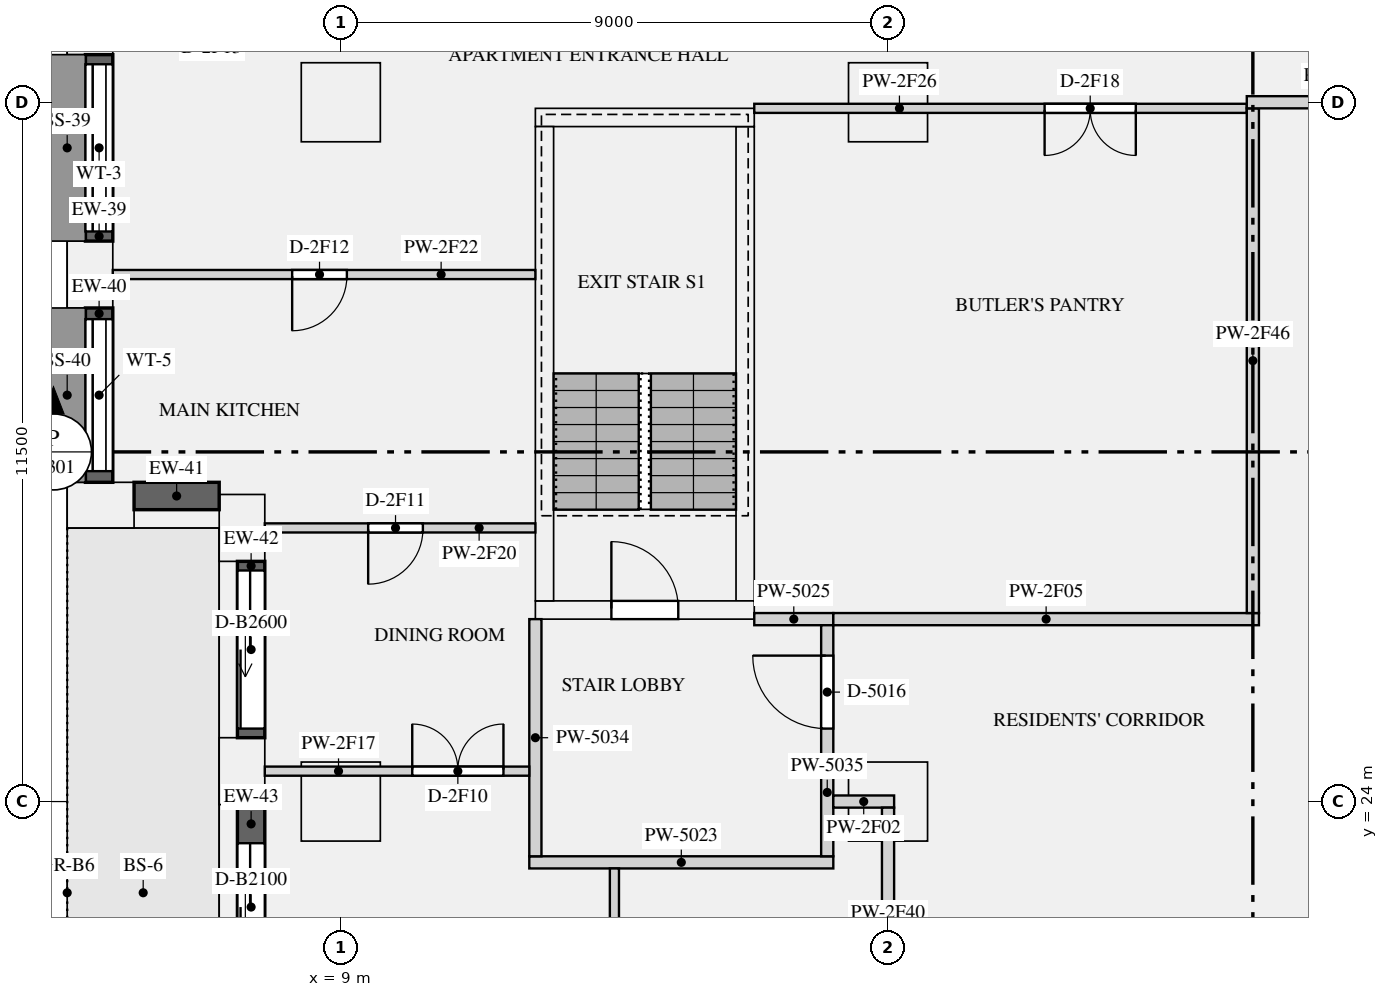
"""IFC4 building model, lengths in metres.
Left out: names, types, materials, properties, quantities, classifications, styles, units other than length and angle.
Written with IfcOpenShell. Run it as: python <this file> out.ifc"""

import sys

from ifc_helpers import new_model, si_unit, direction, frame, frame_2d, origin, origin_2d, place, context, subcontext, project, spatial, rectangle, extrude, element, fill, save


model = new_model("IFC4")
c1 = context("Model", 3, precision=1e-05, world=origin(), true_north=direction((0.0, 1.0)))
c2 = subcontext(c1, "Body", "Model", "MODEL_VIEW")
j1 = project(units=[si_unit("LENGTHUNIT", "METRE"), si_unit("PLANEANGLEUNIT", "RADIAN")], contexts=[c1])
p1 = place(None, origin())
s1 = spatial("IfcSite", under=j1, at=p1, CompositionType="ELEMENT")
p2 = place(p1, origin())
s2 = spatial("IfcBuilding", under=s1, at=p2, CompositionType="ELEMENT")
p3 = place(p2, frame((0.0, 0.0, 124.5)))
s3 = spatial("IfcBuildingStorey", under=s2, at=p3, CompositionType="ELEMENT", Elevation=124.5)
for number, where, z_axis, x_axis in (
    (1, (4.875, 36.833, 0.0), (0.0, 0.0, 1.0), (0.0, -1.0, 0.0)),
    (2, (4.875, 32.667, 0.0), (0.0, 0.0, 1.0), (0.0, -1.0, 0.0)),
    (3, (5.05, 28.875, 0.0), (0.0, 0.0, 1.0), (1.0, 0.0, 0.0)),
    (4, (7.375, 28.5, 0.0), (0.0, 0.0, 1.0), (0.0, -1.0, 0.0)),
    (5, (7.375, 24.5, 0.0), (0.0, 0.0, 1.0), (0.0, -1.0, 0.0)),
):
    element("IfcColumn", number, at=place(p3, frame(where, z_axis=z_axis, x_axis=x_axis)), inside=s3, PredefinedType="USERDEFINED", context=c2, shape_type="SweptSolid", body=[
        extrude(rectangle(XDim=1.1, YDim=0.75, at=origin_2d()), origin(), (0.0, 0.0, 1.0), 3.15),
    ])
for number, where, z_axis, x_axis in (
    (6, (9.0, 24.0, 0.0), (0.0, 0.0, 1.0), (1.0, 0.0, 0.0)),
    (7, (18.0, 24.0, 0.0), (0.0, 0.0, 1.0), (1.0, 0.0, 0.0)),
    (8, (9.0, 35.5, 0.0), (0.0, 0.0, 1.0), (1.0, 0.0, 0.0)),
    (9, (18.0, 35.5, 0.0), (0.0, 0.0, 1.0), (1.0, 0.0, 0.0)),
):
    element("IfcColumn", number, at=place(p3, frame(where, z_axis=z_axis, x_axis=x_axis)), inside=s3, PredefinedType="COLUMN", context=c2, shape_type="SweptSolid", body=[
        extrude(rectangle(XDim=1.3, YDim=1.3, at=origin_2d()), origin(), (0.0, 0.0, 1.0), 3.15),
    ])
p4 = place(p3, frame((12.2, 27.15, 0.0), z_axis=(0.0, 0.0, 1.0), x_axis=(1.0, 0.0, 0.0)))
e10 = element("IfcWall", 10, at=p4, inside=s3, PredefinedType="SHEAR", context=c2, shape_type="SweptSolid", body=[
    extrude(rectangle(XDim=3.6, YDim=0.3, at=frame_2d((1.8, 0.0))), origin(), (0.0, 0.0, 1.0), 3.15),
])
p5 = place(p4, frame((1.25, 0.0, 0.0)))
e11 = element("IfcOpeningElement", 11, at=p5, cuts=e10, PredefinedType="OPENING", context=c2, shape_type="SweptSolid", body=[
    extrude(rectangle(XDim=1.1, YDim=2.1, at=frame_2d((0.55, 1.05))), frame((0.0, 0.16, 0.0), z_axis=(0.0, -1.0, 0.0), x_axis=(1.0, 0.0, 0.0)), (0.0, 0.0, 1.0), 0.32),
])
p6 = place(p3, frame((12.2, 35.25, 0.0), z_axis=(0.0, 0.0, 1.0), x_axis=(1.0, 0.0, 0.0)))
e12 = element("IfcWall", 12, at=p6, inside=s3, PredefinedType="SHEAR", context=c2, shape_type="SweptSolid", body=[
    extrude(rectangle(XDim=3.6, YDim=0.3, at=frame_2d((1.8, 0.0))), origin(), (0.0, 0.0, 1.0), 3.15),
])
for number, where, z_axis, x_axis in (
    (13, (12.35, 27.3, 0.0), (0.0, 0.0, 1.0), (0.0, 1.0, 0.0)),
    (14, (15.65, 27.3, 0.0), (0.0, 0.0, 1.0), (0.0, 1.0, 0.0)),
):
    element("IfcWall", number, at=place(p3, frame(where, z_axis=z_axis, x_axis=x_axis)), inside=s3, PredefinedType="SHEAR", context=c2, shape_type="SweptSolid", body=[
        extrude(rectangle(XDim=7.8, YDim=0.3, at=frame_2d((3.9, 0.0))), origin(), (0.0, 0.0, 1.0), 3.15),
    ])
p7 = place(p3, frame((5.025, 36.283, 0.9), z_axis=(0.0, 0.0, 1.0), x_axis=(0.0, -1.0, 0.0)))
e15 = element("IfcWall", 15, at=p7, inside=s3, PredefinedType="SOLIDWALL", context=c2, shape_type="SweptSolid", body=[
    extrude(rectangle(XDim=3.066, YDim=0.45, at=frame_2d((1.533, 0.0))), origin(), (0.0, 0.0, 1.0), 1.93),
])
p8 = place(p7, frame((0.158, 0.0, 0.15)))
e16 = element("IfcOpeningElement", 16, at=p8, cuts=e15, PredefinedType="OPENING", context=c2, shape_type="SweptSolid", body=[
    extrude(rectangle(XDim=2.75, YDim=1.5, at=frame_2d((1.375, 0.75))), frame((0.0, 0.235, 0.0), z_axis=(0.0, -1.0, 0.0), x_axis=(1.0, 0.0, 0.0)), (0.0, 0.0, 1.0), 0.47),
])
p9 = place(p3, frame((5.025, 32.117, 0.9), z_axis=(0.0, 0.0, 1.0), x_axis=(0.0, -1.0, 0.0)))
e17 = element("IfcWall", 17, at=p9, inside=s3, PredefinedType="SOLIDWALL", context=c2, shape_type="SweptSolid", body=[
    extrude(rectangle(XDim=2.867, YDim=0.45, at=frame_2d((1.434, 0.0))), origin(), (0.0, 0.0, 1.0), 1.93),
])
p10 = place(p9, frame((0.184, 0.0, 0.15)))
e18 = element("IfcOpeningElement", 18, at=p10, cuts=e17, PredefinedType="OPENING", context=c2, shape_type="SweptSolid", body=[
    extrude(rectangle(XDim=2.5, YDim=1.5, at=frame_2d((1.25, 0.75))), frame((0.0, 0.235, 0.0), z_axis=(0.0, -1.0, 0.0), x_axis=(1.0, 0.0, 0.0)), (0.0, 0.0, 1.0), 0.47),
])
p11 = place(p3, frame((5.6, 29.025, 0.9), z_axis=(0.0, 0.0, 1.0), x_axis=(1.0, 0.0, 0.0)))
e19 = element("IfcWall", 19, at=p11, inside=s3, PredefinedType="SOLIDWALL", context=c2, shape_type="SweptSolid", body=[
    extrude(rectangle(XDim=1.4, YDim=0.45, at=frame_2d((0.7, 0.0))), origin(), (0.0, 0.0, 1.0), 1.93),
])
p12 = place(p3, frame((7.525, 27.95, 0.0), z_axis=(0.0, 0.0, 1.0), x_axis=(0.0, -1.0, 0.0)))
e20 = element("IfcWall", 20, at=p12, inside=s3, PredefinedType="SOLIDWALL", context=c2, shape_type="SweptSolid", body=[
    extrude(rectangle(XDim=2.9, YDim=0.45, at=frame_2d((1.45, 0.0))), origin(), (0.0, 0.0, 1.0), 2.83),
])
p13 = place(p12, frame((0.15, 0.0, 0.0)))
e21 = element("IfcOpeningElement", 21, at=p13, cuts=e20, PredefinedType="OPENING", context=c2, shape_type="SweptSolid", body=[
    extrude(rectangle(XDim=2.6, YDim=2.3, at=frame_2d((1.3, 1.15))), frame((0.0, 0.235, 0.0), z_axis=(0.0, -1.0, 0.0), x_axis=(1.0, 0.0, 0.0)), (0.0, 0.0, 1.0), 0.47),
])
p14 = place(p3, frame((7.525, 23.95, 0.0), z_axis=(0.0, 0.0, 1.0), x_axis=(0.0, -1.0, 0.0)))
e22 = element("IfcWall", 22, at=p14, inside=s3, PredefinedType="SOLIDWALL", context=c2, shape_type="SweptSolid", body=[
    extrude(rectangle(XDim=2.9, YDim=0.45, at=frame_2d((1.45, 0.0))), origin(), (0.0, 0.0, 1.0), 2.83),
])
p15 = place(p14, frame((0.635, 0.0, 0.0)))
e23 = element("IfcOpeningElement", 23, at=p15, cuts=e22, PredefinedType="OPENING", context=c2, shape_type="SweptSolid", body=[
    extrude(rectangle(XDim=2.1, YDim=2.3, at=frame_2d((1.05, 1.15))), frame((0.0, 0.235, 0.0), z_axis=(0.0, -1.0, 0.0), x_axis=(1.0, 0.0, 0.0)), (0.0, 0.0, 1.0), 0.47),
])
p16 = place(p3, frame((12.1, 23.0, 0.0), z_axis=(0.0, 0.0, 1.0), x_axis=(1.0, 0.0, 0.0)))
e24 = element("IfcWall", 24, at=p16, inside=s3, PredefinedType="PARTITIONING", context=c2, shape_type="SweptSolid", body=[
    extrude(rectangle(XDim=5.0, YDim=0.2, at=frame_2d((2.5, 0.0))), origin(), (0.0, 0.0, 1.0), 2.83),
])
p17 = place(p3, frame((15.8, 27.0, 0.0), z_axis=(0.0, 0.0, 1.0), x_axis=(1.0, 0.0, 0.0)))
e25 = element("IfcWall", 25, at=p17, inside=s3, PredefinedType="PARTITIONING", context=c2, shape_type="SweptSolid", body=[
    extrude(rectangle(XDim=1.3, YDim=0.2, at=frame_2d((0.65, 0.0))), origin(), (0.0, 0.0, 1.0), 2.83),
])
p18 = place(p3, frame((12.2, 23.1, 0.0), z_axis=(0.0, 0.0, 1.0), x_axis=(0.0, 1.0, 0.0)))
e26 = element("IfcWall", 26, at=p18, inside=s3, PredefinedType="PARTITIONING", context=c2, shape_type="SweptSolid", body=[
    extrude(rectangle(XDim=3.9, YDim=0.2, at=frame_2d((1.95, 0.0))), origin(), (0.0, 0.0, 1.0), 2.83),
])
p19 = place(p3, frame((17.0, 23.1, 0.0), z_axis=(0.0, 0.0, 1.0), x_axis=(0.0, 1.0, 0.0)))
e27 = element("IfcWall", 27, at=p19, inside=s3, PredefinedType="PARTITIONING", context=c2, shape_type="SweptSolid", body=[
    extrude(rectangle(XDim=3.8, YDim=0.2, at=frame_2d((1.9, 0.0))), origin(), (0.0, 0.0, 1.0), 2.83),
])
p20 = place(p19, frame((2.1, 0.0, 0.0)))
e28 = element("IfcOpeningElement", 28, at=p20, cuts=e27, PredefinedType="OPENING", context=c2, shape_type="SweptSolid", body=[
    extrude(rectangle(XDim=1.2, YDim=2.1, at=frame_2d((0.6, 1.05))), frame((0.0, 0.11, 0.0), z_axis=(0.0, -1.0, 0.0), x_axis=(1.0, 0.0, 0.0)), (0.0, 0.0, 1.0), 0.22),
])
p21 = place(p3, frame((17.1, 24.0, 0.0), z_axis=(0.0, 0.0, 1.0), x_axis=(1.0, 0.0, 0.0)))
e29 = element("IfcWall", 29, at=p21, inside=s3, PredefinedType="PARTITIONING", context=c2, shape_type="SweptSolid", body=[
    extrude(rectangle(XDim=1.0, YDim=0.2, at=frame_2d((0.5, 0.0))), origin(), (0.0, 0.0, 1.0), 2.83),
])
p22 = place(p3, frame((17.1, 27.0, 0.0), z_axis=(0.0, 0.0, 1.0), x_axis=(1.0, 0.0, 0.0)))
e30 = element("IfcWall", 30, at=p22, inside=s3, PredefinedType="PARTITIONING", context=c2, shape_type="SweptSolid", body=[
    extrude(rectangle(XDim=7.0, YDim=0.2, at=frame_2d((3.5, 0.0))), origin(), (0.0, 0.0, 1.0), 2.83),
])
p23 = place(p3, frame((23.9, 35.5, 0.0), z_axis=(0.0, 0.0, 1.0), x_axis=(1.0, 0.0, 0.0)))
e31 = element("IfcWall", 31, at=p23, inside=s3, PredefinedType="PARTITIONING", context=c2, shape_type="SweptSolid", body=[
    extrude(rectangle(XDim=3.1, YDim=0.2, at=frame_2d((1.55, 0.0))), origin(), (0.0, 0.0, 1.0), 2.83),
])
p24 = place(p3, frame((7.75, 24.5, 0.0), z_axis=(0.0, 0.0, 1.0), x_axis=(1.0, 0.0, 0.0)))
e32 = element("IfcWall", 32, at=p24, inside=s3, PredefinedType="PARTITIONING", context=c2, shape_type="SweptSolid", body=[
    extrude(rectangle(XDim=4.35, YDim=0.15, at=frame_2d((2.175, 0.0))), origin(), (0.0, 0.0, 1.0), 2.83),
])
p25 = place(p24, frame((2.425, 0.0, 0.0)))
e33 = element("IfcOpeningElement", 33, at=p25, cuts=e32, PredefinedType="OPENING", context=c2, shape_type="SweptSolid", body=[
    extrude(rectangle(XDim=1.5, YDim=2.1, at=frame_2d((0.75, 1.05))), frame((0.0, 0.085, 0.0), z_axis=(0.0, -1.0, 0.0), x_axis=(1.0, 0.0, 0.0)), (0.0, 0.0, 1.0), 0.17),
])
p26 = place(p3, frame((7.75, 28.5, 0.0), z_axis=(0.0, 0.0, 1.0), x_axis=(1.0, 0.0, 0.0)))
e34 = element("IfcWall", 34, at=p26, inside=s3, PredefinedType="PARTITIONING", context=c2, shape_type="SweptSolid", body=[
    extrude(rectangle(XDim=4.45, YDim=0.15, at=frame_2d((2.225, 0.0))), origin(), (0.0, 0.0, 1.0), 2.83),
])
p27 = place(p26, frame((1.7, 0.0, 0.0)))
e35 = element("IfcOpeningElement", 35, at=p27, cuts=e34, PredefinedType="OPENING", context=c2, shape_type="SweptSolid", body=[
    extrude(rectangle(XDim=0.9, YDim=2.1, at=frame_2d((0.45, 1.05))), frame((0.0, 0.085, 0.0), z_axis=(0.0, -1.0, 0.0), x_axis=(1.0, 0.0, 0.0)), (0.0, 0.0, 1.0), 0.17),
])
p28 = place(p3, frame((5.25, 32.667, 0.0), z_axis=(0.0, 0.0, 1.0), x_axis=(1.0, 0.0, 0.0)))
e36 = element("IfcWall", 36, at=p28, inside=s3, PredefinedType="PARTITIONING", context=c2, shape_type="SweptSolid", body=[
    extrude(rectangle(XDim=6.95, YDim=0.15, at=frame_2d((3.475, 0.0))), origin(), (0.0, 0.0, 1.0), 2.83),
])
p29 = place(p28, frame((2.95, 0.0, 0.0)))
e37 = element("IfcOpeningElement", 37, at=p29, cuts=e36, PredefinedType="OPENING", context=c2, shape_type="SweptSolid", body=[
    extrude(rectangle(XDim=0.9, YDim=2.1, at=frame_2d((0.45, 1.05))), frame((0.0, 0.085, 0.0), z_axis=(0.0, -1.0, 0.0), x_axis=(1.0, 0.0, 0.0)), (0.0, 0.0, 1.0), 0.17),
])
p30 = place(p3, frame((15.8, 35.4, 0.0), z_axis=(0.0, 0.0, 1.0), x_axis=(1.0, 0.0, 0.0)))
e38 = element("IfcWall", 38, at=p30, inside=s3, PredefinedType="PARTITIONING", context=c2, shape_type="SweptSolid", body=[
    extrude(rectangle(XDim=8.1, YDim=0.15, at=frame_2d((4.05, 0.0))), origin(), (0.0, 0.0, 1.0), 2.83),
])
p31 = place(p30, frame((4.775, 0.0, 0.0)))
e39 = element("IfcOpeningElement", 39, at=p31, cuts=e38, PredefinedType="OPENING", context=c2, shape_type="SweptSolid", body=[
    extrude(rectangle(XDim=1.5, YDim=2.1, at=frame_2d((0.75, 1.05))), frame((0.0, 0.085, 0.0), z_axis=(0.0, -1.0, 0.0), x_axis=(1.0, 0.0, 0.0)), (0.0, 0.0, 1.0), 0.17),
])
p32 = place(p3, frame((18.0, 16.1, 0.0), z_axis=(0.0, 0.0, 1.0), x_axis=(0.0, 1.0, 0.0)))
e40 = element("IfcWall", 40, at=p32, inside=s3, PredefinedType="PARTITIONING", context=c2, shape_type="SweptSolid", body=[
    extrude(rectangle(XDim=7.8, YDim=0.2, at=frame_2d((3.9, 0.0))), origin(), (0.0, 0.0, 1.0), 2.83),
])
p33 = place(p32, frame((2.35, 0.0, 0.0)))
e41 = element("IfcOpeningElement", 41, at=p33, cuts=e40, PredefinedType="OPENING", context=c2, shape_type="SweptSolid", body=[
    extrude(rectangle(XDim=1.1, YDim=2.1, at=frame_2d((0.55, 1.05))), frame((0.0, 0.11, 0.0), z_axis=(0.0, -1.0, 0.0), x_axis=(1.0, 0.0, 0.0)), (0.0, 0.0, 1.0), 0.22),
])
p34 = place(p3, frame((24.0, 27.1, 0.0), z_axis=(0.0, 0.0, 1.0), x_axis=(0.0, 1.0, 0.0)))
e42 = element("IfcWall", 42, at=p34, inside=s3, PredefinedType="PARTITIONING", context=c2, shape_type="SweptSolid", body=[
    extrude(rectangle(XDim=8.3, YDim=0.2, at=frame_2d((4.15, 0.0))), origin(), (0.0, 0.0, 1.0), 2.83),
])
p35 = place(p3, frame((13.5, 12.575, 0.0), z_axis=(0.0, 0.0, 1.0), x_axis=(0.0, 1.0, 0.0)))
e43 = element("IfcWall", 43, at=p35, inside=s3, PredefinedType="PARTITIONING", context=c2, shape_type="SweptSolid", body=[
    extrude(rectangle(XDim=10.325, YDim=0.15, at=frame_2d((5.163, 0.0))), origin(), (0.0, 0.0, 1.0), 2.83),
])
p36 = place(p35, frame((1.475, 0.0, 0.0)))
e44 = element("IfcOpeningElement", 44, at=p36, cuts=e43, PredefinedType="OPENING", context=c2, shape_type="SweptSolid", body=[
    extrude(rectangle(XDim=0.9, YDim=2.1, at=frame_2d((0.45, 1.05))), frame((0.0, 0.085, 0.0), z_axis=(0.0, -1.0, 0.0), x_axis=(1.0, 0.0, 0.0)), (0.0, 0.0, 1.0), 0.17),
])
p37 = place(p35, frame((6.45, 0.0, 0.0)))
e45 = element("IfcOpeningElement", 45, at=p37, cuts=e43, PredefinedType="OPENING", context=c2, shape_type="SweptSolid", body=[
    extrude(rectangle(XDim=1.5, YDim=2.1, at=frame_2d((0.75, 1.05))), frame((0.0, 0.085, 0.0), z_axis=(0.0, -1.0, 0.0), x_axis=(1.0, 0.0, 0.0)), (0.0, 0.0, 1.0), 0.17),
])
p38 = place(p8, origin())
e46 = element("IfcWindow", 46, at=p38, inside=s3, PartitioningType="SINGLE_PANEL", PredefinedType="WINDOW", context=c2, shape_type="SweptSolid", body=[
    extrude(rectangle(XDim=2.75, YDim=1.5, at=frame_2d((1.375, 0.75))), frame((0.0, -0.065, 0.0), z_axis=(0.0, -1.0, 0.0), x_axis=(1.0, 0.0, 0.0)), (0.0, 0.0, 1.0), 0.06),
])
fill(e16, e46)
p39 = place(p10, origin())
e47 = element("IfcWindow", 47, at=p39, inside=s3, PartitioningType="SINGLE_PANEL", PredefinedType="WINDOW", context=c2, shape_type="SweptSolid", body=[
    extrude(rectangle(XDim=2.5, YDim=1.5, at=frame_2d((1.25, 0.75))), frame((0.0, -0.065, 0.0), z_axis=(0.0, -1.0, 0.0), x_axis=(1.0, 0.0, 0.0)), (0.0, 0.0, 1.0), 0.06),
])
fill(e18, e47)
p40 = place(p13, origin())
e48 = element("IfcDoor", 48, at=p40, inside=s3, OperationType="SLIDING_TO_LEFT", PredefinedType="DOOR", context=c2, shape_type="SweptSolid", body=[
    extrude(rectangle(XDim=2.6, YDim=2.3, at=frame_2d((1.3, 1.15))), frame((0.0, -0.07, 0.0), z_axis=(0.0, -1.0, 0.0), x_axis=(1.0, 0.0, 0.0)), (0.0, 0.0, 1.0), 0.05),
])
fill(e21, e48)
p41 = place(p15, origin())
e49 = element("IfcDoor", 49, at=p41, inside=s3, OperationType="SLIDING_TO_LEFT", PredefinedType="DOOR", context=c2, shape_type="SweptSolid", body=[
    extrude(rectangle(XDim=2.1, YDim=2.3, at=frame_2d((1.05, 1.15))), frame((0.0, -0.07, 0.0), z_axis=(0.0, -1.0, 0.0), x_axis=(1.0, 0.0, 0.0)), (0.0, 0.0, 1.0), 0.05),
])
fill(e23, e49)
p42 = place(p5, origin())
e50 = element("IfcDoor", 50, at=p42, inside=s3, OperationType="SINGLE_SWING_LEFT", PredefinedType="DOOR", context=c2, shape_type="SweptSolid", body=[
    extrude(rectangle(XDim=1.1, YDim=2.1, at=frame_2d((0.55, 1.05))), frame((0.0, 0.025, 0.0), z_axis=(0.0, -1.0, 0.0), x_axis=(1.0, 0.0, 0.0)), (0.0, 0.0, 1.0), 0.05),
])
fill(e11, e50)
p43 = place(p20, origin())
e51 = element("IfcDoor", 51, at=p43, inside=s3, OperationType="SINGLE_SWING_RIGHT", PredefinedType="DOOR", context=c2, shape_type="SweptSolid", body=[
    extrude(rectangle(XDim=1.2, YDim=2.1, at=frame_2d((0.6, 1.05))), frame((0.0, 0.025, 0.0), z_axis=(0.0, -1.0, 0.0), x_axis=(1.0, 0.0, 0.0)), (0.0, 0.0, 1.0), 0.05),
])
fill(e28, e51)
p44 = place(p25, origin())
e52 = element("IfcDoor", 52, at=p44, inside=s3, OperationType="DOUBLE_DOOR_SINGLE_SWING", PredefinedType="DOOR", context=c2, shape_type="SweptSolid", body=[
    extrude(rectangle(XDim=1.5, YDim=2.1, at=frame_2d((0.75, 1.05))), frame((0.0, 0.025, 0.0), z_axis=(0.0, -1.0, 0.0), x_axis=(1.0, 0.0, 0.0)), (0.0, 0.0, 1.0), 0.05),
])
fill(e33, e52)
p45 = place(p27, frame((0.9, 0.0, 0.0), z_axis=(0.0, 0.0, 1.0), x_axis=(-1.0, 0.0, 0.0)))
e53 = element("IfcDoor", 53, at=p45, inside=s3, OperationType="SINGLE_SWING_RIGHT", PredefinedType="DOOR", context=c2, shape_type="SweptSolid", body=[
    extrude(rectangle(XDim=0.9, YDim=2.1, at=frame_2d((0.45, 1.05))), frame((0.0, 0.025, 0.0), z_axis=(0.0, -1.0, 0.0), x_axis=(1.0, 0.0, 0.0)), (0.0, 0.0, 1.0), 0.05),
])
fill(e35, e53)
p46 = place(p29, frame((0.9, 0.0, 0.0), z_axis=(0.0, 0.0, 1.0), x_axis=(-1.0, 0.0, 0.0)))
e54 = element("IfcDoor", 54, at=p46, inside=s3, OperationType="SINGLE_SWING_RIGHT", PredefinedType="DOOR", context=c2, shape_type="SweptSolid", body=[
    extrude(rectangle(XDim=0.9, YDim=2.1, at=frame_2d((0.45, 1.05))), frame((0.0, 0.025, 0.0), z_axis=(0.0, -1.0, 0.0), x_axis=(1.0, 0.0, 0.0)), (0.0, 0.0, 1.0), 0.05),
])
fill(e37, e54)
p47 = place(p31, frame((1.5, 0.0, 0.0), z_axis=(0.0, 0.0, 1.0), x_axis=(-1.0, 0.0, 0.0)))
e55 = element("IfcDoor", 55, at=p47, inside=s3, OperationType="DOUBLE_DOOR_SINGLE_SWING", PredefinedType="DOOR", context=c2, shape_type="SweptSolid", body=[
    extrude(rectangle(XDim=1.5, YDim=2.1, at=frame_2d((0.75, 1.05))), frame((0.0, 0.025, 0.0), z_axis=(0.0, -1.0, 0.0), x_axis=(1.0, 0.0, 0.0)), (0.0, 0.0, 1.0), 0.05),
])
fill(e39, e55)
save(model, sys.argv[1])
